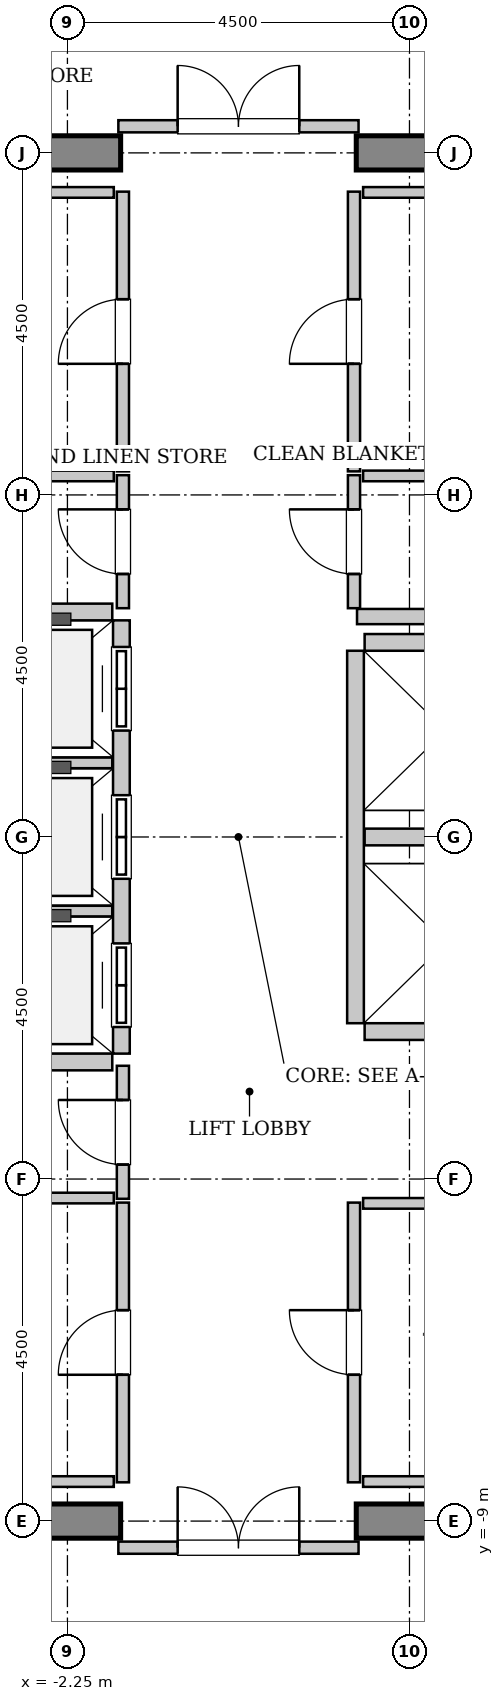
"""IFC4 building model, lengths in metres.
Left out: names, types, materials, properties, quantities, classifications, styles, units other than length and angle.
Written with IfcOpenShell. Run it as: python <this file> out.ifc"""

import sys

from ifc_helpers import new_model, si_unit, direction, frame, frame_2d, origin, place, context, subcontext, project, spatial, rectangle, extrude, source, transform, mapped, element, fill, save


model = new_model("IFC4")
c1 = context("Model", 3, precision=1e-05, world=origin(), true_north=direction((0.0, 1.0)))
c2 = subcontext(c1, "Body", "Model", "MODEL_VIEW")
j1 = project(units=[si_unit("LENGTHUNIT", "METRE"), si_unit("PLANEANGLEUNIT", "RADIAN")], contexts=[c1])
p1 = place(None, origin())
s1 = spatial("IfcSite", under=j1, at=p1, CompositionType="ELEMENT")
p2 = place(p1, origin())
s2 = spatial("IfcBuilding", under=s1, at=p2, CompositionType="ELEMENT")
p3 = place(p2, frame((0.0, 0.0, 283.6)))
s3 = spatial("IfcBuildingStorey", under=s2, at=p3, CompositionType="ELEMENT", Elevation=283.6)
m1 = source(origin(), c2, "Body", "SweptSolid", [
    extrude(rectangle(XDim=9.925, YDim=0.45, at=frame_2d((4.962, 0.0))), origin(), (0.0, 0.0, 1.0), 3.8),
])
for number, where, z_axis, x_axis in (
    (1, (-11.475, 9.0, 0.0), (0.0, 0.0, 1.0), (1.0, 0.0, 0.0)),
    (2, (1.55, 9.0, 0.0), (0.0, 0.0, 1.0), (1.0, 0.0, 0.0)),
    (3, (-11.475, -9.0, 0.0), (0.0, 0.0, 1.0), (1.0, 0.0, 0.0)),
    (4, (1.55, -9.0, 0.0), (0.0, 0.0, 1.0), (1.0, 0.0, 0.0)),
):
    element("IfcWall", number, at=place(p3, frame(where, z_axis=z_axis, x_axis=x_axis)), inside=s3, PredefinedType="SHEAR", context=c2, shape_type="MappedRepresentation", body=[
        mapped(m1, transform((0.0, 0.0, 0.0), x_axis=(1.0, 0.0, 0.0), y_axis=(0.0, 1.0, 0.0), z_axis=(0.0, 0.0, 1.0), scale=1.0)),
    ])
m2 = source(origin(), c2, "Body", "SweptSolid", [
    extrude(rectangle(XDim=5.7, YDim=0.22, at=frame_2d((2.85, 0.0))), origin(), (0.0, 0.0, 1.0), 3.535),
])
p4 = place(p3, frame((-1.54, -2.85, 0.0), z_axis=(0.0, 0.0, 1.0), x_axis=(0.0, 1.0, 0.0)))
e5 = element("IfcWall", 5, at=p4, inside=s3, PredefinedType="SOLIDWALL", context=c2, shape_type="MappedRepresentation", body=[
    mapped(m2, transform((0.0, 0.0, 0.0), x_axis=(1.0, 0.0, 0.0), y_axis=(0.0, 1.0, 0.0), z_axis=(0.0, 0.0, 1.0), scale=1.0)),
])
p5 = place(p4, frame((0.35, 0.0, 0.0)))
e6 = element("IfcOpeningElement", 6, at=p5, cuts=e5, PredefinedType="OPENING", context=c2, shape_type="SweptSolid", body=[
    extrude(rectangle(XDim=1.1, YDim=2.2, at=frame_2d((0.55, 1.1))), frame((0.0, 0.12, 0.0), z_axis=(0.0, -1.0, 0.0), x_axis=(1.0, 0.0, 0.0)), (0.0, 0.0, 1.0), 0.24),
])
p6 = place(p4, frame((2.3, 0.0, 0.0)))
e7 = element("IfcOpeningElement", 7, at=p6, cuts=e5, PredefinedType="OPENING", context=c2, shape_type="SweptSolid", body=[
    extrude(rectangle(XDim=1.1, YDim=2.2, at=frame_2d((0.55, 1.1))), frame((0.0, 0.12, 0.0), z_axis=(0.0, -1.0, 0.0), x_axis=(1.0, 0.0, 0.0)), (0.0, 0.0, 1.0), 0.24),
])
p7 = place(p4, frame((4.25, 0.0, 0.0)))
e8 = element("IfcOpeningElement", 8, at=p7, cuts=e5, PredefinedType="OPENING", context=c2, shape_type="SweptSolid", body=[
    extrude(rectangle(XDim=1.1, YDim=2.2, at=frame_2d((0.55, 1.1))), frame((0.0, 0.12, 0.0), z_axis=(0.0, -1.0, 0.0), x_axis=(1.0, 0.0, 0.0)), (0.0, 0.0, 1.0), 0.24),
])
m3 = source(origin(), c2, "Body", "SweptSolid", [
    extrude(rectangle(XDim=2.13, YDim=0.22, at=frame_2d((1.065, 0.0))), origin(), (0.0, 0.0, 1.0), 3.535),
])
p8 = place(p3, frame((-3.79, -2.96, 0.0), z_axis=(0.0, 0.0, 1.0), x_axis=(1.0, 0.0, 0.0)))
e9 = element("IfcWall", 9, at=p8, inside=s3, PredefinedType="SOLIDWALL", context=c2, shape_type="MappedRepresentation", body=[
    mapped(m3, transform((0.0, 0.0, 0.0), x_axis=(1.0, 0.0, 0.0), y_axis=(0.0, 1.0, 0.0), z_axis=(0.0, 0.0, 1.0), scale=1.0)),
])
m4 = source(origin(), c2, "Body", "SweptSolid", [
    extrude(rectangle(XDim=2.13, YDim=0.14, at=frame_2d((1.065, 0.0))), origin(), (0.0, 0.0, 1.0), 3.535),
])
for number, where, z_axis, x_axis in (
    (10, (-3.79, -0.975, 0.0), (0.0, 0.0, 1.0), (1.0, 0.0, 0.0)),
    (11, (-3.79, 0.975, 0.0), (0.0, 0.0, 1.0), (1.0, 0.0, 0.0)),
):
    element("IfcWall", number, at=place(p3, frame(where, z_axis=z_axis, x_axis=x_axis)), inside=s3, PredefinedType="PARTITIONING", context=c2, shape_type="MappedRepresentation", body=[
        mapped(m4, transform((0.0, 0.0, 0.0), x_axis=(1.0, 0.0, 0.0), y_axis=(0.0, 1.0, 0.0), z_axis=(0.0, 0.0, 1.0), scale=1.0)),
    ])
p9 = place(p3, frame((-1.66, 2.96, 0.0), z_axis=(0.0, 0.0, 1.0), x_axis=(-1.0, 0.0, 0.0)))
e12 = element("IfcWall", 12, at=p9, inside=s3, PredefinedType="SOLIDWALL", context=c2, shape_type="MappedRepresentation", body=[
    mapped(m3, transform((0.0, 0.0, 0.0), x_axis=(1.0, 0.0, 0.0), y_axis=(0.0, 1.0, 0.0), z_axis=(0.0, 0.0, 1.0), scale=1.0)),
])
m5 = source(origin(), c2, "Body", "SweptSolid", [
    extrude(rectangle(XDim=4.9, YDim=0.22, at=frame_2d((2.45, 0.0))), origin(), (0.0, 0.0, 1.0), 3.535),
])
p10 = place(p3, frame((1.54, 2.45, 0.0), z_axis=(0.0, 0.0, 1.0), x_axis=(0.0, -1.0, 0.0)))
e13 = element("IfcWall", 13, at=p10, inside=s3, PredefinedType="SOLIDWALL", context=c2, shape_type="MappedRepresentation", body=[
    mapped(m5, transform((0.0, 0.0, 0.0), x_axis=(1.0, 0.0, 0.0), y_axis=(0.0, 1.0, 0.0), z_axis=(0.0, 0.0, 1.0), scale=1.0)),
])
for number, where, z_axis, x_axis in (
    (14, (1.66, -2.56, 0.0), (0.0, 0.0, 1.0), (1.0, 0.0, 0.0)),
    (15, (1.66, 0.0, 0.0), (0.0, 0.0, 1.0), (1.0, 0.0, 0.0)),
    (16, (3.79, 2.56, 0.0), (0.0, 0.0, 1.0), (-1.0, 0.0, 0.0)),
):
    element("IfcWall", number, at=place(p3, frame(where, z_axis=z_axis, x_axis=x_axis)), inside=s3, PredefinedType="SOLIDWALL", context=c2, shape_type="MappedRepresentation", body=[
        mapped(m3, transform((0.0, 0.0, 0.0), x_axis=(1.0, 0.0, 0.0), y_axis=(0.0, 1.0, 0.0), z_axis=(0.0, 0.0, 1.0), scale=1.0)),
    ])
m6 = source(origin(), c2, "Body", "SweptSolid", [
    extrude(rectangle(XDim=2.52, YDim=0.2, at=frame_2d((1.26, 0.0))), origin(), (0.0, 0.0, 1.0), 3.535),
])
p11 = place(p3, frame((1.56, 2.9, 0.0), z_axis=(0.0, 0.0, 1.0), x_axis=(1.0, 0.0, 0.0)))
e17 = element("IfcWall", 17, at=p11, inside=s3, PredefinedType="PARTITIONING", context=c2, shape_type="MappedRepresentation", body=[
    mapped(m6, transform((0.0, 0.0, 0.0), x_axis=(1.0, 0.0, 0.0), y_axis=(0.0, 1.0, 0.0), z_axis=(0.0, 0.0, 1.0), scale=1.0)),
])
m7 = source(origin(), c2, "Body", "SweptSolid", [
    extrude(rectangle(XDim=3.16, YDim=0.16, at=frame_2d((1.58, 0.0))), origin(), (0.0, 0.0, 1.0), 2.625),
])
p12 = place(p3, frame((-1.58, 9.35, 0.0), z_axis=(0.0, 0.0, 1.0), x_axis=(1.0, 0.0, 0.0)))
e18 = element("IfcWall", 18, at=p12, inside=s3, PredefinedType="PARTITIONING", context=c2, shape_type="MappedRepresentation", body=[
    mapped(m7, transform((0.0, 0.0, 0.0), x_axis=(1.0, 0.0, 0.0), y_axis=(0.0, 1.0, 0.0), z_axis=(0.0, 0.0, 1.0), scale=1.0)),
])
p13 = place(p12, frame((0.78, 0.0, 0.0)))
e19 = element("IfcOpeningElement", 19, at=p13, cuts=e18, PredefinedType="OPENING", context=c2, shape_type="SweptSolid", body=[
    extrude(rectangle(XDim=1.6, YDim=2.3, at=frame_2d((0.8, 1.15))), frame((0.0, 0.09, 0.0), z_axis=(0.0, -1.0, 0.0), x_axis=(1.0, 0.0, 0.0)), (0.0, 0.0, 1.0), 0.18),
])
p14 = place(p3, frame((-1.58, -9.35, 0.0), z_axis=(0.0, 0.0, 1.0), x_axis=(1.0, 0.0, 0.0)))
e20 = element("IfcWall", 20, at=p14, inside=s3, PredefinedType="PARTITIONING", context=c2, shape_type="MappedRepresentation", body=[
    mapped(m7, transform((0.0, 0.0, 0.0), x_axis=(1.0, 0.0, 0.0), y_axis=(0.0, 1.0, 0.0), z_axis=(0.0, 0.0, 1.0), scale=1.0)),
])
p15 = place(p14, frame((0.78, 0.0, 0.0)))
e21 = element("IfcOpeningElement", 21, at=p15, cuts=e20, PredefinedType="OPENING", context=c2, shape_type="SweptSolid", body=[
    extrude(rectangle(XDim=1.6, YDim=2.3, at=frame_2d((0.8, 1.15))), frame((0.0, 0.09, 0.0), z_axis=(0.0, -1.0, 0.0), x_axis=(1.0, 0.0, 0.0)), (0.0, 0.0, 1.0), 0.18),
])
m8 = source(origin(), c2, "Body", "SweptSolid", [
    extrude(rectangle(XDim=1.75, YDim=0.16, at=frame_2d((0.875, 0.0))), origin(), (0.0, 0.0, 1.0), 3.535),
])
p16 = place(p3, frame((-1.52, 3.01, 0.0), z_axis=(0.0, 0.0, 1.0), x_axis=(0.0, 1.0, 0.0)))
e22 = element("IfcWall", 22, at=p16, inside=s3, PredefinedType="PARTITIONING", context=c2, shape_type="MappedRepresentation", body=[
    mapped(m8, transform((0.0, 0.0, 0.0), x_axis=(1.0, 0.0, 0.0), y_axis=(0.0, 1.0, 0.0), z_axis=(0.0, 0.0, 1.0), scale=1.0)),
])
p17 = place(p16, frame((0.45, 0.0, 0.0)))
e23 = element("IfcOpeningElement", 23, at=p17, cuts=e22, PredefinedType="OPENING", context=c2, shape_type="SweptSolid", body=[
    extrude(rectangle(XDim=0.85, YDim=2.1, at=frame_2d((0.425, 1.05))), frame((0.0, 0.09, 0.0), z_axis=(0.0, -1.0, 0.0), x_axis=(1.0, 0.0, 0.0)), (0.0, 0.0, 1.0), 0.18),
])
m9 = source(origin(), c2, "Body", "SweptSolid", [
    extrude(rectangle(XDim=2.95, YDim=0.14, at=frame_2d((1.475, 0.0))), origin(), (0.0, 0.0, 1.0), 3.535),
])
p18 = place(p3, frame((-4.59, 4.75, 0.0), z_axis=(0.0, 0.0, 1.0), x_axis=(1.0, 0.0, 0.0)))
e24 = element("IfcWall", 24, at=p18, inside=s3, PredefinedType="PARTITIONING", context=c2, shape_type="MappedRepresentation", body=[
    mapped(m9, transform((0.0, 0.0, 0.0), x_axis=(1.0, 0.0, 0.0), y_axis=(0.0, 1.0, 0.0), z_axis=(0.0, 0.0, 1.0), scale=1.0)),
])
m10 = source(origin(), c2, "Body", "SweptSolid", [
    extrude(rectangle(XDim=3.68, YDim=0.16, at=frame_2d((1.84, 0.0))), origin(), (0.0, 0.0, 1.0), 3.535),
])
p19 = place(p3, frame((-1.52, 4.81, 0.0), z_axis=(0.0, 0.0, 1.0), x_axis=(0.0, 1.0, 0.0)))
e25 = element("IfcWall", 25, at=p19, inside=s3, PredefinedType="PARTITIONING", context=c2, shape_type="MappedRepresentation", body=[
    mapped(m10, transform((0.0, 0.0, 0.0), x_axis=(1.0, 0.0, 0.0), y_axis=(0.0, 1.0, 0.0), z_axis=(0.0, 0.0, 1.0), scale=1.0)),
])
p20 = place(p19, frame((1.415, 0.0, 0.0)))
e26 = element("IfcOpeningElement", 26, at=p20, cuts=e25, PredefinedType="OPENING", context=c2, shape_type="SweptSolid", body=[
    extrude(rectangle(XDim=0.85, YDim=2.1, at=frame_2d((0.425, 1.05))), frame((0.0, 0.09, 0.0), z_axis=(0.0, -1.0, 0.0), x_axis=(1.0, 0.0, 0.0)), (0.0, 0.0, 1.0), 0.18),
])
m11 = source(origin(), c2, "Body", "SweptSolid", [
    extrude(rectangle(XDim=3.15, YDim=0.14, at=frame_2d((1.575, 0.0))), origin(), (0.0, 0.0, 1.0), 3.535),
])
p21 = place(p3, frame((-4.79, 8.48, 0.0), z_axis=(0.0, 0.0, 1.0), x_axis=(1.0, 0.0, 0.0)))
e27 = element("IfcWall", 27, at=p21, inside=s3, PredefinedType="PARTITIONING", context=c2, shape_type="MappedRepresentation", body=[
    mapped(m11, transform((0.0, 0.0, 0.0), x_axis=(1.0, 0.0, 0.0), y_axis=(0.0, 1.0, 0.0), z_axis=(0.0, 0.0, 1.0), scale=1.0)),
])
p22 = place(p3, frame((1.52, 3.01, 0.0), z_axis=(0.0, 0.0, 1.0), x_axis=(0.0, 1.0, 0.0)))
e28 = element("IfcWall", 28, at=p22, inside=s3, PredefinedType="PARTITIONING", context=c2, shape_type="MappedRepresentation", body=[
    mapped(m8, transform((0.0, 0.0, 0.0), x_axis=(1.0, 0.0, 0.0), y_axis=(0.0, 1.0, 0.0), z_axis=(0.0, 0.0, 1.0), scale=1.0)),
])
p23 = place(p22, frame((0.45, 0.0, 0.0)))
e29 = element("IfcOpeningElement", 29, at=p23, cuts=e28, PredefinedType="OPENING", context=c2, shape_type="SweptSolid", body=[
    extrude(rectangle(XDim=0.85, YDim=2.1, at=frame_2d((0.425, 1.05))), frame((0.0, 0.09, 0.0), z_axis=(0.0, -1.0, 0.0), x_axis=(1.0, 0.0, 0.0)), (0.0, 0.0, 1.0), 0.18),
])
p24 = place(p3, frame((1.64, 4.75, 0.0), z_axis=(0.0, 0.0, 1.0), x_axis=(1.0, 0.0, 0.0)))
e30 = element("IfcWall", 30, at=p24, inside=s3, PredefinedType="PARTITIONING", context=c2, shape_type="MappedRepresentation", body=[
    mapped(m11, transform((0.0, 0.0, 0.0), x_axis=(1.0, 0.0, 0.0), y_axis=(0.0, 1.0, 0.0), z_axis=(0.0, 0.0, 1.0), scale=1.0)),
])
p25 = place(p3, frame((1.52, 4.81, 0.0), z_axis=(0.0, 0.0, 1.0), x_axis=(0.0, 1.0, 0.0)))
e31 = element("IfcWall", 31, at=p25, inside=s3, PredefinedType="PARTITIONING", context=c2, shape_type="MappedRepresentation", body=[
    mapped(m10, transform((0.0, 0.0, 0.0), x_axis=(1.0, 0.0, 0.0), y_axis=(0.0, 1.0, 0.0), z_axis=(0.0, 0.0, 1.0), scale=1.0)),
])
p26 = place(p25, frame((1.415, 0.0, 0.0)))
e32 = element("IfcOpeningElement", 32, at=p26, cuts=e31, PredefinedType="OPENING", context=c2, shape_type="SweptSolid", body=[
    extrude(rectangle(XDim=0.85, YDim=2.1, at=frame_2d((0.425, 1.05))), frame((0.0, 0.09, 0.0), z_axis=(0.0, -1.0, 0.0), x_axis=(1.0, 0.0, 0.0)), (0.0, 0.0, 1.0), 0.18),
])
p27 = place(p3, frame((1.64, 8.48, 0.0), z_axis=(0.0, 0.0, 1.0), x_axis=(1.0, 0.0, 0.0)))
e33 = element("IfcWall", 33, at=p27, inside=s3, PredefinedType="PARTITIONING", context=c2, shape_type="MappedRepresentation", body=[
    mapped(m11, transform((0.0, 0.0, 0.0), x_axis=(1.0, 0.0, 0.0), y_axis=(0.0, 1.0, 0.0), z_axis=(0.0, 0.0, 1.0), scale=1.0)),
])
p28 = place(p3, frame((-1.52, -4.76, 0.0), z_axis=(0.0, 0.0, 1.0), x_axis=(0.0, 1.0, 0.0)))
e34 = element("IfcWall", 34, at=p28, inside=s3, PredefinedType="PARTITIONING", context=c2, shape_type="MappedRepresentation", body=[
    mapped(m8, transform((0.0, 0.0, 0.0), x_axis=(1.0, 0.0, 0.0), y_axis=(0.0, 1.0, 0.0), z_axis=(0.0, 0.0, 1.0), scale=1.0)),
])
p29 = place(p28, frame((0.45, 0.0, 0.0)))
e35 = element("IfcOpeningElement", 35, at=p29, cuts=e34, PredefinedType="OPENING", context=c2, shape_type="SweptSolid", body=[
    extrude(rectangle(XDim=0.85, YDim=2.1, at=frame_2d((0.425, 1.05))), frame((0.0, 0.09, 0.0), z_axis=(0.0, -1.0, 0.0), x_axis=(1.0, 0.0, 0.0)), (0.0, 0.0, 1.0), 0.18),
])
p30 = place(p3, frame((-4.79, -4.75, 0.0), z_axis=(0.0, 0.0, 1.0), x_axis=(1.0, 0.0, 0.0)))
e36 = element("IfcWall", 36, at=p30, inside=s3, PredefinedType="PARTITIONING", context=c2, shape_type="MappedRepresentation", body=[
    mapped(m11, transform((0.0, 0.0, 0.0), x_axis=(1.0, 0.0, 0.0), y_axis=(0.0, 1.0, 0.0), z_axis=(0.0, 0.0, 1.0), scale=1.0)),
])
p31 = place(p3, frame((-1.52, -8.49, 0.0), z_axis=(0.0, 0.0, 1.0), x_axis=(0.0, 1.0, 0.0)))
e37 = element("IfcWall", 37, at=p31, inside=s3, PredefinedType="PARTITIONING", context=c2, shape_type="MappedRepresentation", body=[
    mapped(m10, transform((0.0, 0.0, 0.0), x_axis=(1.0, 0.0, 0.0), y_axis=(0.0, 1.0, 0.0), z_axis=(0.0, 0.0, 1.0), scale=1.0)),
])
p32 = place(p31, frame((1.415, 0.0, 0.0)))
e38 = element("IfcOpeningElement", 38, at=p32, cuts=e37, PredefinedType="OPENING", context=c2, shape_type="SweptSolid", body=[
    extrude(rectangle(XDim=0.85, YDim=2.1, at=frame_2d((0.425, 1.05))), frame((0.0, 0.09, 0.0), z_axis=(0.0, -1.0, 0.0), x_axis=(1.0, 0.0, 0.0)), (0.0, 0.0, 1.0), 0.18),
])
m12 = source(origin(), c2, "Body", "SweptSolid", [
    extrude(rectangle(XDim=3.03, YDim=0.14, at=frame_2d((1.515, 0.0))), origin(), (0.0, 0.0, 1.0), 3.535),
])
p33 = place(p3, frame((-4.67, -8.48, 0.0), z_axis=(0.0, 0.0, 1.0), x_axis=(1.0, 0.0, 0.0)))
e39 = element("IfcWall", 39, at=p33, inside=s3, PredefinedType="PARTITIONING", context=c2, shape_type="MappedRepresentation", body=[
    mapped(m12, transform((0.0, 0.0, 0.0), x_axis=(1.0, 0.0, 0.0), y_axis=(0.0, 1.0, 0.0), z_axis=(0.0, 0.0, 1.0), scale=1.0)),
])
p34 = place(p3, frame((1.52, -8.49, 0.0), z_axis=(0.0, 0.0, 1.0), x_axis=(0.0, 1.0, 0.0)))
e40 = element("IfcWall", 40, at=p34, inside=s3, PredefinedType="PARTITIONING", context=c2, shape_type="MappedRepresentation", body=[
    mapped(m10, transform((0.0, 0.0, 0.0), x_axis=(1.0, 0.0, 0.0), y_axis=(0.0, 1.0, 0.0), z_axis=(0.0, 0.0, 1.0), scale=1.0)),
])
p35 = place(p34, frame((1.415, 0.0, 0.0)))
e41 = element("IfcOpeningElement", 41, at=p35, cuts=e40, PredefinedType="OPENING", context=c2, shape_type="SweptSolid", body=[
    extrude(rectangle(XDim=0.85, YDim=2.1, at=frame_2d((0.425, 1.05))), frame((0.0, 0.09, 0.0), z_axis=(0.0, -1.0, 0.0), x_axis=(1.0, 0.0, 0.0)), (0.0, 0.0, 1.0), 0.18),
])
p36 = place(p3, frame((1.64, -4.82, 0.0), z_axis=(0.0, 0.0, 1.0), x_axis=(1.0, 0.0, 0.0)))
e42 = element("IfcWall", 42, at=p36, inside=s3, PredefinedType="PARTITIONING", context=c2, shape_type="MappedRepresentation", body=[
    mapped(m9, transform((0.0, 0.0, 0.0), x_axis=(1.0, 0.0, 0.0), y_axis=(0.0, 1.0, 0.0), z_axis=(0.0, 0.0, 1.0), scale=1.0)),
])
p37 = place(p3, frame((1.64, -8.48, 0.0), z_axis=(0.0, 0.0, 1.0), x_axis=(1.0, 0.0, 0.0)))
e43 = element("IfcWall", 43, at=p37, inside=s3, PredefinedType="PARTITIONING", context=c2, shape_type="MappedRepresentation", body=[
    mapped(m11, transform((0.0, 0.0, 0.0), x_axis=(1.0, 0.0, 0.0), y_axis=(0.0, 1.0, 0.0), z_axis=(0.0, 0.0, 1.0), scale=1.0)),
])
m13 = source(origin(), c2, "Body", "SweptSolid", [
    extrude(rectangle(XDim=1.1, YDim=2.2, at=frame_2d((0.55, 1.1))), frame((0.0, 0.025, 0.0), z_axis=(0.0, -1.0, 0.0), x_axis=(1.0, 0.0, 0.0)), (0.0, 0.0, 1.0), 0.05),
])
p38 = place(p5, origin())
e44 = element("IfcDoor", 44, at=p38, inside=s3, OperationType="DOUBLE_DOOR_SLIDING", PredefinedType="DOOR", context=c2, shape_type="MappedRepresentation", body=[
    mapped(m13, transform((0.0, 0.0, 0.0), x_axis=(1.0, 0.0, 0.0), y_axis=(0.0, 1.0, 0.0), z_axis=(0.0, 0.0, 1.0), scale=1.0)),
])
fill(e6, e44)
p39 = place(p6, origin())
e45 = element("IfcDoor", 45, at=p39, inside=s3, OperationType="DOUBLE_DOOR_SLIDING", PredefinedType="DOOR", context=c2, shape_type="MappedRepresentation", body=[
    mapped(m13, transform((0.0, 0.0, 0.0), x_axis=(1.0, 0.0, 0.0), y_axis=(0.0, 1.0, 0.0), z_axis=(0.0, 0.0, 1.0), scale=1.0)),
])
fill(e7, e45)
p40 = place(p7, origin())
e46 = element("IfcDoor", 46, at=p40, inside=s3, OperationType="DOUBLE_DOOR_SLIDING", PredefinedType="DOOR", context=c2, shape_type="MappedRepresentation", body=[
    mapped(m13, transform((0.0, 0.0, 0.0), x_axis=(1.0, 0.0, 0.0), y_axis=(0.0, 1.0, 0.0), z_axis=(0.0, 0.0, 1.0), scale=1.0)),
])
fill(e8, e46)
m14 = source(origin(), c2, "Body", "SweptSolid", [
    extrude(rectangle(XDim=1.6, YDim=2.3, at=frame_2d((0.8, 1.15))), frame((0.0, 0.025, 0.0), z_axis=(0.0, -1.0, 0.0), x_axis=(1.0, 0.0, 0.0)), (0.0, 0.0, 1.0), 0.05),
])
p41 = place(p13, origin())
e47 = element("IfcDoor", 47, at=p41, inside=s3, OperationType="DOUBLE_DOOR_SINGLE_SWING", PredefinedType="DOOR", context=c2, shape_type="MappedRepresentation", body=[
    mapped(m14, transform((0.0, 0.0, 0.0), x_axis=(1.0, 0.0, 0.0), y_axis=(0.0, 1.0, 0.0), z_axis=(0.0, 0.0, 1.0), scale=1.0)),
])
fill(e19, e47)
p42 = place(p15, origin())
e48 = element("IfcDoor", 48, at=p42, inside=s3, OperationType="DOUBLE_DOOR_SINGLE_SWING", PredefinedType="DOOR", context=c2, shape_type="MappedRepresentation", body=[
    mapped(m14, transform((0.0, 0.0, 0.0), x_axis=(1.0, 0.0, 0.0), y_axis=(0.0, 1.0, 0.0), z_axis=(0.0, 0.0, 1.0), scale=1.0)),
])
fill(e21, e48)
m15 = source(origin(), c2, "Body", "SweptSolid", [
    extrude(rectangle(XDim=0.85, YDim=2.1, at=frame_2d((0.425, 1.05))), frame((0.0, 0.025, 0.0), z_axis=(0.0, -1.0, 0.0), x_axis=(1.0, 0.0, 0.0)), (0.0, 0.0, 1.0), 0.05),
])
p43 = place(p17, origin())
e49 = element("IfcDoor", 49, at=p43, inside=s3, OperationType="SINGLE_SWING_RIGHT", PredefinedType="DOOR", context=c2, shape_type="MappedRepresentation", body=[
    mapped(m15, transform((0.0, 0.0, 0.0), x_axis=(1.0, 0.0, 0.0), y_axis=(0.0, 1.0, 0.0), z_axis=(0.0, 0.0, 1.0), scale=1.0)),
])
fill(e23, e49)
p44 = place(p20, origin())
e50 = element("IfcDoor", 50, at=p44, inside=s3, OperationType="SINGLE_SWING_LEFT", PredefinedType="DOOR", context=c2, shape_type="MappedRepresentation", body=[
    mapped(m15, transform((0.0, 0.0, 0.0), x_axis=(1.0, 0.0, 0.0), y_axis=(0.0, 1.0, 0.0), z_axis=(0.0, 0.0, 1.0), scale=1.0)),
])
fill(e26, e50)
p45 = place(p23, origin())
e51 = element("IfcDoor", 51, at=p45, inside=s3, OperationType="SINGLE_SWING_RIGHT", PredefinedType="DOOR", context=c2, shape_type="MappedRepresentation", body=[
    mapped(m15, transform((0.0, 0.0, 0.0), x_axis=(1.0, 0.0, 0.0), y_axis=(0.0, 1.0, 0.0), z_axis=(0.0, 0.0, 1.0), scale=1.0)),
])
fill(e29, e51)
p46 = place(p26, origin())
e52 = element("IfcDoor", 52, at=p46, inside=s3, OperationType="SINGLE_SWING_LEFT", PredefinedType="DOOR", context=c2, shape_type="MappedRepresentation", body=[
    mapped(m15, transform((0.0, 0.0, 0.0), x_axis=(1.0, 0.0, 0.0), y_axis=(0.0, 1.0, 0.0), z_axis=(0.0, 0.0, 1.0), scale=1.0)),
])
fill(e32, e52)
p47 = place(p29, origin())
e53 = element("IfcDoor", 53, at=p47, inside=s3, OperationType="SINGLE_SWING_RIGHT", PredefinedType="DOOR", context=c2, shape_type="MappedRepresentation", body=[
    mapped(m15, transform((0.0, 0.0, 0.0), x_axis=(1.0, 0.0, 0.0), y_axis=(0.0, 1.0, 0.0), z_axis=(0.0, 0.0, 1.0), scale=1.0)),
])
fill(e35, e53)
p48 = place(p32, origin())
e54 = element("IfcDoor", 54, at=p48, inside=s3, OperationType="SINGLE_SWING_LEFT", PredefinedType="DOOR", context=c2, shape_type="MappedRepresentation", body=[
    mapped(m15, transform((0.0, 0.0, 0.0), x_axis=(1.0, 0.0, 0.0), y_axis=(0.0, 1.0, 0.0), z_axis=(0.0, 0.0, 1.0), scale=1.0)),
])
fill(e38, e54)
p49 = place(p35, origin())
e55 = element("IfcDoor", 55, at=p49, inside=s3, OperationType="SINGLE_SWING_RIGHT", PredefinedType="DOOR", context=c2, shape_type="MappedRepresentation", body=[
    mapped(m15, transform((0.0, 0.0, 0.0), x_axis=(1.0, 0.0, 0.0), y_axis=(0.0, 1.0, 0.0), z_axis=(0.0, 0.0, 1.0), scale=1.0)),
])
fill(e41, e55)
save(model, sys.argv[1])
